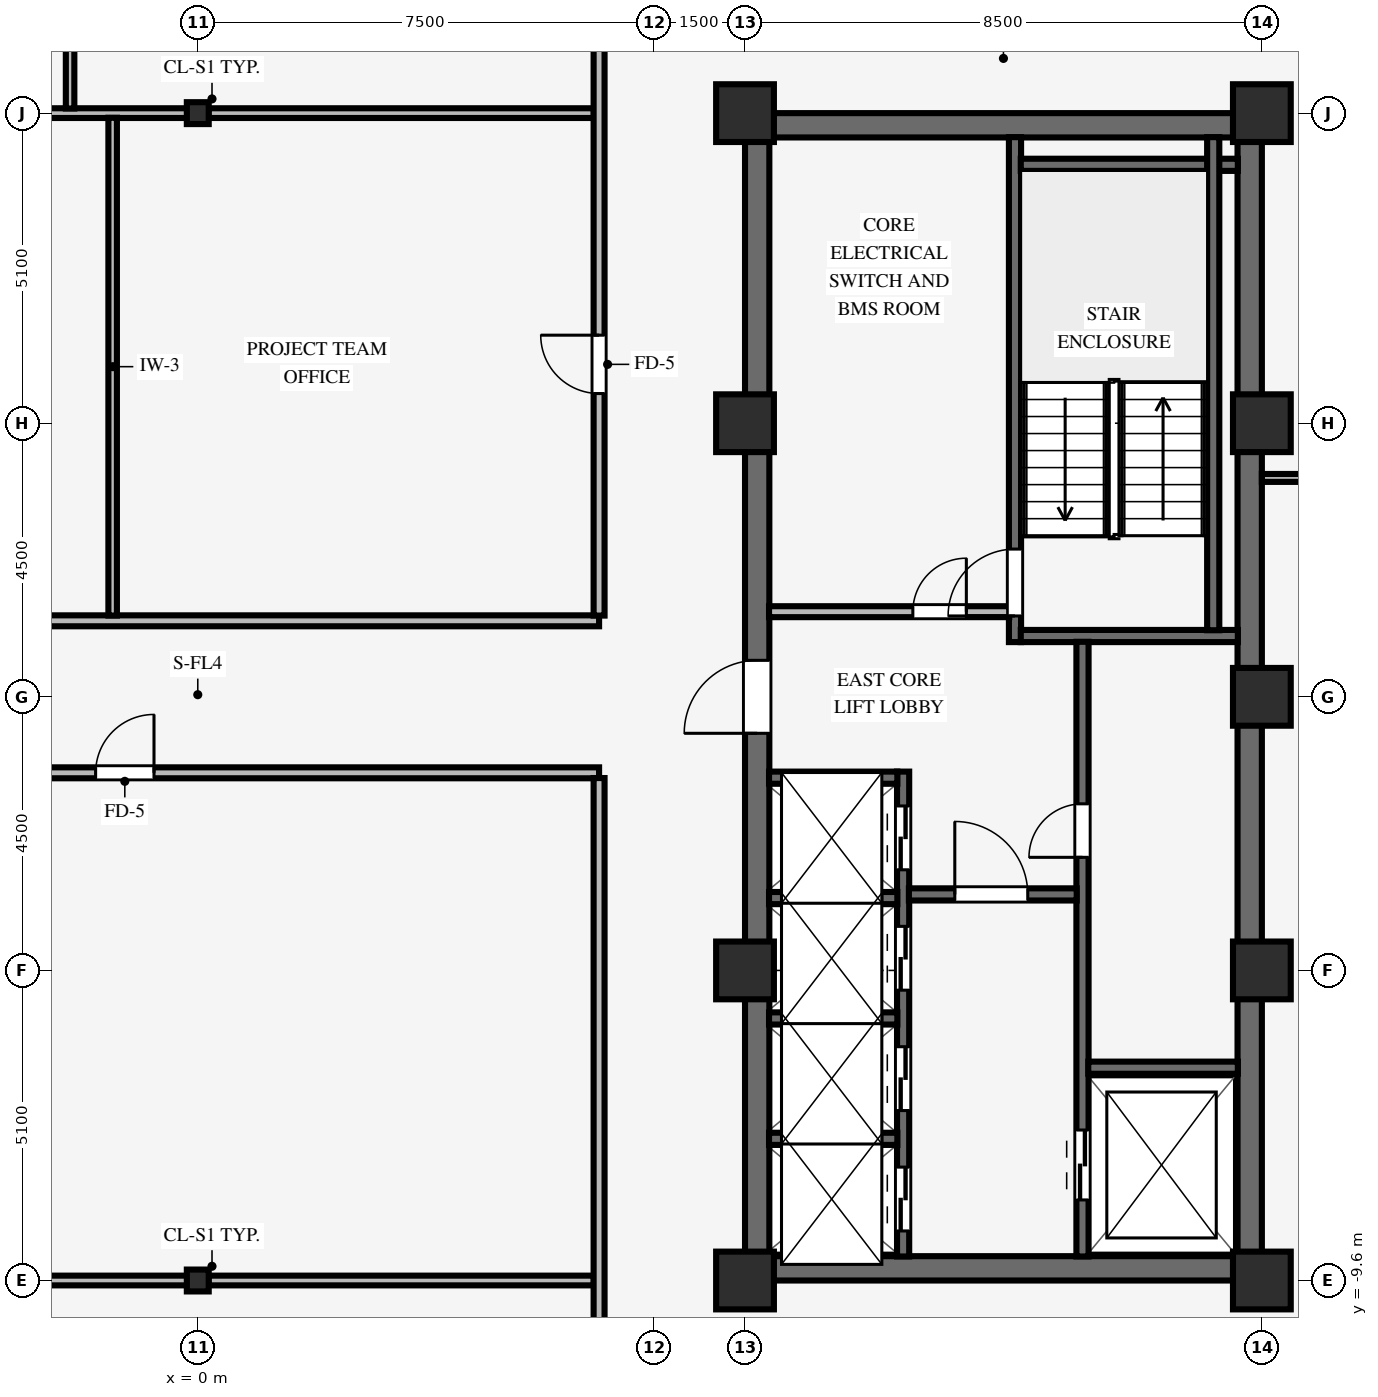
"""IFC4 building model, lengths in metres.
Left out: names, types, materials, properties, quantities, classifications, styles, units other than length and angle.
Written with IfcOpenShell. Run it as: python <this file> out.ifc"""

import sys

from ifc_helpers import new_model, si_unit, direction, frame, frame_2d, origin, origin_2d, place, context, subcontext, project, spatial, rectangle, i_section, extrude, source, transform, mapped, element, fill, save


model = new_model("IFC4")
c1 = context("Model", 3, precision=1e-05, world=origin(), true_north=direction((0.0, 1.0)))
c2 = subcontext(c1, "Body", "Model", "MODEL_VIEW")
j1 = project(units=[si_unit("LENGTHUNIT", "METRE"), si_unit("PLANEANGLEUNIT", "RADIAN")], contexts=[c1])
p1 = place(None, origin())
s1 = spatial("IfcSite", under=j1, at=p1, CompositionType="ELEMENT")
p2 = place(p1, origin())
s2 = spatial("IfcBuilding", under=s1, at=p2, CompositionType="ELEMENT")
p3 = place(p2, frame((0.0, 0.0, 164.0)))
s3 = spatial("IfcBuildingStorey", under=s2, at=p3, CompositionType="ELEMENT", Elevation=164.0)
for number, where, z_axis, x_axis in (
    (1, (9.0, -9.4, 0.0), (0.0, 0.0, 1.0), (1.0, 0.0, 0.0)),
    (2, (9.0, 9.4, 0.0), (0.0, 0.0, 1.0), (1.0, 0.0, 0.0)),
):
    element("IfcWall", number, at=place(p3, frame(where, z_axis=z_axis, x_axis=x_axis)), inside=s3, PredefinedType="SHEAR", context=c2, shape_type="SweptSolid", body=[
        extrude(rectangle(XDim=8.5, YDim=0.4, at=frame_2d((4.25, 0.0))), origin(), (0.0, 0.0, 1.0), 3.25),
    ])
p4 = place(p3, frame((9.2, -9.205, 0.0), z_axis=(0.0, 0.0, 1.0), x_axis=(0.0, 1.0, 0.0)))
e3 = element("IfcWall", 3, at=p4, inside=s3, PredefinedType="SHEAR", context=c2, shape_type="SweptSolid", body=[
    extrude(rectangle(XDim=18.41, YDim=0.4, at=frame_2d((9.205, 0.0))), origin(), (0.0, 0.0, 1.0), 3.25),
])
p5 = place(p4, frame((8.605, 0.0, 0.0)))
e4 = element("IfcOpeningElement", 4, at=p5, cuts=e3, PredefinedType="OPENING", context=c2, shape_type="SweptSolid", body=[
    extrude(rectangle(XDim=1.2, YDim=2.15, at=frame_2d((0.6, 1.075))), frame((0.0, 0.21, 0.0), z_axis=(0.0, -1.0, 0.0), x_axis=(1.0, 0.0, 0.0)), (0.0, 0.0, 1.0), 0.42),
])
p6 = place(p3, frame((17.3, -9.205, 0.0), z_axis=(0.0, 0.0, 1.0), x_axis=(0.0, 1.0, 0.0)))
e5 = element("IfcWall", 5, at=p6, inside=s3, PredefinedType="SHEAR", context=c2, shape_type="SweptSolid", body=[
    extrude(rectangle(XDim=18.41, YDim=0.4, at=frame_2d((9.205, 0.0))), origin(), (0.0, 0.0, 1.0), 3.25),
])
for number, where, z_axis, x_axis in (
    (6, (9.0, -9.6, 0.0), (0.0, 0.0, 1.0), (1.0, 0.0, 0.0)),
    (7, (9.0, -4.5, 0.0), (0.0, 0.0, 1.0), (1.0, 0.0, 0.0)),
    (8, (9.0, 4.5, 0.0), (0.0, 0.0, 1.0), (1.0, 0.0, 0.0)),
    (9, (9.0, 9.6, 0.0), (0.0, 0.0, 1.0), (1.0, 0.0, 0.0)),
    (10, (17.5, -9.6, 0.0), (0.0, 0.0, 1.0), (1.0, 0.0, 0.0)),
    (11, (17.5, -4.5, 0.0), (0.0, 0.0, 1.0), (1.0, 0.0, 0.0)),
    (12, (17.5, 4.5, 0.0), (0.0, 0.0, 1.0), (1.0, 0.0, 0.0)),
    (13, (17.5, 9.6, 0.0), (0.0, 0.0, 1.0), (1.0, 0.0, 0.0)),
    (14, (17.5, 0.0, 0.0), (0.0, 0.0, 1.0), (1.0, 0.0, 0.0)),
):
    element("IfcColumn", number, at=place(p3, frame(where, z_axis=z_axis, x_axis=x_axis)), inside=s3, PredefinedType="COLUMN", context=c2, shape_type="SweptSolid", body=[
        extrude(rectangle(XDim=0.95, YDim=0.95, at=origin_2d()), origin(), (0.0, 0.0, 1.0), 3.25),
    ])
for number, where, z_axis, x_axis in (
    (15, (0.0, -9.6, 0.0), (0.0, 0.0, 1.0), (1.0, 0.0, 0.0)),
    (16, (0.0, 9.6, 0.0), (0.0, 0.0, 1.0), (1.0, 0.0, 0.0)),
):
    element("IfcColumn", number, at=place(p3, frame(where, z_axis=z_axis, x_axis=x_axis)), inside=s3, PredefinedType="COLUMN", context=c2, shape_type="SweptSolid", body=[
        extrude(i_section(OverallWidth=0.36, OverallDepth=0.36, WebThickness=0.021, FlangeThickness=0.021, FilletRadius=0.018, at=origin_2d()), origin(), (0.0, 0.0, 1.0), 3.25),
    ])
p7 = place(p3, frame((13.44, 0.9, 0.0), z_axis=(0.0, 0.0, 1.0), x_axis=(0.0, 1.0, 0.0)))
e17 = element("IfcWall", 17, at=p7, inside=s3, PredefinedType="SHEAR", context=c2, shape_type="SweptSolid", body=[
    extrude(rectangle(XDim=8.305, YDim=0.2, at=frame_2d((4.153, 0.0))), origin(), (0.0, 0.0, 1.0), 3.25),
])
p8 = place(p7, frame((0.43, 0.0, 0.0)))
e18 = element("IfcOpeningElement", 18, at=p8, cuts=e17, PredefinedType="OPENING", context=c2, shape_type="SweptSolid", body=[
    extrude(rectangle(XDim=1.1, YDim=2.15, at=frame_2d((0.55, 1.075))), frame((0.0, 0.11, 0.0), z_axis=(0.0, -1.0, 0.0), x_axis=(1.0, 0.0, 0.0)), (0.0, 0.0, 1.0), 0.22),
])
for number, where, z_axis, x_axis in (
    (19, (13.535, 1.0, 0.0), (0.0, 0.0, 1.0), (1.0, 0.0, 0.0)),
    (20, (13.535, 8.75, 0.0), (0.0, 0.0, 1.0), (1.0, 0.0, 0.0)),
):
    element("IfcWall", number, at=place(p3, frame(where, z_axis=z_axis, x_axis=x_axis)), inside=s3, PredefinedType="SHEAR", context=c2, shape_type="SweptSolid", body=[
        extrude(rectangle(XDim=3.57, YDim=0.2, at=frame_2d((1.785, 0.0))), origin(), (0.0, 0.0, 1.0), 3.25),
    ])
p9 = place(p3, frame((16.7, 1.095, 0.0), z_axis=(0.0, 0.0, 1.0), x_axis=(0.0, 1.0, 0.0)))
e21 = element("IfcWall", 21, at=p9, inside=s3, PredefinedType="SHEAR", context=c2, shape_type="SweptSolid", body=[
    extrude(rectangle(XDim=8.11, YDim=0.2, at=frame_2d((4.055, 0.0))), origin(), (0.0, 0.0, 1.0), 3.25),
])
p10 = place(p3, frame((14.55, -9.205, 0.0), z_axis=(0.0, 0.0, 1.0), x_axis=(0.0, 1.0, 0.0)))
e22 = element("IfcWall", 22, at=p10, inside=s3, PredefinedType="SHEAR", context=c2, shape_type="SweptSolid", body=[
    extrude(rectangle(XDim=10.11, YDim=0.2, at=frame_2d((5.055, 0.0))), origin(), (0.0, 0.0, 1.0), 3.25),
])
p11 = place(p10, frame((6.565, 0.0, 0.0)))
e23 = element("IfcOpeningElement", 23, at=p11, cuts=e22, PredefinedType="OPENING", context=c2, shape_type="SweptSolid", body=[
    extrude(rectangle(XDim=0.88, YDim=2.1, at=frame_2d((0.44, 1.05))), frame((0.0, 0.11, 0.0), z_axis=(0.0, -1.0, 0.0), x_axis=(1.0, 0.0, 0.0)), (0.0, 0.0, 1.0), 0.22),
])
p12 = place(p10, frame((0.93, 0.0, 0.0)))
e24 = element("IfcOpeningElement", 24, at=p12, cuts=e22, PredefinedType="OPENING", context=c2, shape_type="SweptSolid", body=[
    extrude(rectangle(XDim=1.15, YDim=2.15, at=frame_2d((0.575, 1.075))), frame((0.0, 0.11, 0.0), z_axis=(0.0, -1.0, 0.0), x_axis=(1.0, 0.0, 0.0)), (0.0, 0.0, 1.0), 0.22),
])
p13 = place(p3, frame((14.645, -6.1, 0.0), z_axis=(0.0, 0.0, 1.0), x_axis=(1.0, 0.0, 0.0)))
e25 = element("IfcWall", 25, at=p13, inside=s3, PredefinedType="SHEAR", context=c2, shape_type="SweptSolid", body=[
    extrude(rectangle(XDim=2.46, YDim=0.2, at=frame_2d((1.23, 0.0))), origin(), (0.0, 0.0, 1.0), 3.25),
])
p14 = place(p3, frame((11.6, -9.205, 0.0), z_axis=(0.0, 0.0, 1.0), x_axis=(0.0, 1.0, 0.0)))
e26 = element("IfcWall", 26, at=p14, inside=s3, PredefinedType="SHEAR", context=c2, shape_type="SweptSolid", body=[
    extrude(rectangle(XDim=7.975, YDim=0.2, at=frame_2d((3.988, 0.0))), origin(), (0.0, 0.0, 1.0), 3.25),
])
p15 = place(p14, frame((0.42, 0.0, 0.0)))
e27 = element("IfcOpeningElement", 27, at=p15, cuts=e26, PredefinedType="OPENING", context=c2, shape_type="SweptSolid", body=[
    extrude(rectangle(XDim=1.05, YDim=2.15, at=frame_2d((0.525, 1.075))), frame((0.0, 0.11, 0.0), z_axis=(0.0, -1.0, 0.0), x_axis=(1.0, 0.0, 0.0)), (0.0, 0.0, 1.0), 0.22),
])
p16 = place(p14, frame((2.4, 0.0, 0.0)))
e28 = element("IfcOpeningElement", 28, at=p16, cuts=e26, PredefinedType="OPENING", context=c2, shape_type="SweptSolid", body=[
    extrude(rectangle(XDim=1.05, YDim=2.15, at=frame_2d((0.525, 1.075))), frame((0.0, 0.11, 0.0), z_axis=(0.0, -1.0, 0.0), x_axis=(1.0, 0.0, 0.0)), (0.0, 0.0, 1.0), 0.22),
])
p17 = place(p14, frame((4.38, 0.0, 0.0)))
e29 = element("IfcOpeningElement", 29, at=p17, cuts=e26, PredefinedType="OPENING", context=c2, shape_type="SweptSolid", body=[
    extrude(rectangle(XDim=1.05, YDim=2.15, at=frame_2d((0.525, 1.075))), frame((0.0, 0.11, 0.0), z_axis=(0.0, -1.0, 0.0), x_axis=(1.0, 0.0, 0.0)), (0.0, 0.0, 1.0), 0.22),
])
p18 = place(p14, frame((6.36, 0.0, 0.0)))
e30 = element("IfcOpeningElement", 30, at=p18, cuts=e26, PredefinedType="OPENING", context=c2, shape_type="SweptSolid", body=[
    extrude(rectangle(XDim=1.05, YDim=2.15, at=frame_2d((0.525, 1.075))), frame((0.0, 0.11, 0.0), z_axis=(0.0, -1.0, 0.0), x_axis=(1.0, 0.0, 0.0)), (0.0, 0.0, 1.0), 0.22),
])
p19 = place(p3, frame((11.695, -3.25, 0.0), z_axis=(0.0, 0.0, 1.0), x_axis=(1.0, 0.0, 0.0)))
e31 = element("IfcWall", 31, at=p19, inside=s3, PredefinedType="SHEAR", context=c2, shape_type="SweptSolid", body=[
    extrude(rectangle(XDim=2.76, YDim=0.2, at=frame_2d((1.38, 0.0))), origin(), (0.0, 0.0, 1.0), 3.25),
])
p20 = place(p19, frame((0.755, 0.0, 0.0)))
e32 = element("IfcOpeningElement", 32, at=p20, cuts=e31, PredefinedType="OPENING", context=c2, shape_type="SweptSolid", body=[
    extrude(rectangle(XDim=1.2, YDim=2.15, at=frame_2d((0.6, 1.075))), frame((0.0, 0.11, 0.0), z_axis=(0.0, -1.0, 0.0), x_axis=(1.0, 0.0, 0.0)), (0.0, 0.0, 1.0), 0.22),
])
for number, where, z_axis, x_axis in (
    (33, (9.395, -7.27, 0.0), (0.0, 0.0, 1.0), (1.0, 0.0, 0.0)),
    (34, (9.395, -5.29, 0.0), (0.0, 0.0, 1.0), (1.0, 0.0, 0.0)),
    (35, (9.395, -3.31, 0.0), (0.0, 0.0, 1.0), (1.0, 0.0, 0.0)),
    (36, (9.395, -1.33, 0.0), (0.0, 0.0, 1.0), (1.0, 0.0, 0.0)),
):
    element("IfcWall", number, at=place(p3, frame(where, z_axis=z_axis, x_axis=x_axis)), inside=s3, PredefinedType="SHEAR", context=c2, shape_type="SweptSolid", body=[
        extrude(rectangle(XDim=2.11, YDim=0.2, at=frame_2d((1.055, 0.0))), origin(), (0.0, 0.0, 1.0), 3.25),
    ])
p21 = place(p3, frame((9.395, 1.4, 0.0), z_axis=(0.0, 0.0, 1.0), x_axis=(1.0, 0.0, 0.0)))
e37 = element("IfcWall", 37, at=p21, inside=s3, PredefinedType="PARTITIONING", context=c2, shape_type="SweptSolid", body=[
    extrude(rectangle(XDim=3.95, YDim=0.18, at=frame_2d((1.975, 0.0))), origin(), (0.0, 0.0, 1.0), 3.24),
])
p22 = place(p21, frame((2.365, 0.0, 0.0)))
e38 = element("IfcOpeningElement", 38, at=p22, cuts=e37, PredefinedType="OPENING", context=c2, shape_type="SweptSolid", body=[
    extrude(rectangle(XDim=0.88, YDim=2.1, at=frame_2d((0.44, 1.05))), frame((0.0, 0.1, 0.0), z_axis=(0.0, -1.0, 0.0), x_axis=(1.0, 0.0, 0.0)), (0.0, 0.0, 1.0), 0.2),
])
p23 = place(p3, frame((-8.529, -9.6, 0.0), z_axis=(0.0, 0.0, 1.0), x_axis=(1.0, 0.0, 0.0)))
e39 = element("IfcWall", 39, at=p23, inside=s3, PredefinedType="PARTITIONING", context=c2, shape_type="SweptSolid", body=[
    extrude(rectangle(XDim=8.353, YDim=0.16, at=frame_2d((4.177, 0.0))), origin(), (0.0, 0.0, 1.0), 2.285),
])
p24 = place(p3, frame((0.176, -9.6, 0.0), z_axis=(0.0, 0.0, 1.0), x_axis=(1.0, 0.0, 0.0)))
e40 = element("IfcWall", 40, at=p24, inside=s3, PredefinedType="PARTITIONING", context=c2, shape_type="SweptSolid", body=[
    extrude(rectangle(XDim=6.338, YDim=0.16, at=frame_2d((3.169, 0.0))), origin(), (0.0, 0.0, 1.0), 2.285),
])
p25 = place(p3, frame((-9.0, -1.25, 0.0), z_axis=(0.0, 0.0, 1.0), x_axis=(1.0, 0.0, 0.0)))
e41 = element("IfcWall", 41, at=p25, inside=s3, PredefinedType="PARTITIONING", context=c2, shape_type="SweptSolid", body=[
    extrude(rectangle(XDim=15.6, YDim=0.18, at=frame_2d((7.8, 0.0))), origin(), (0.0, 0.0, 1.0), 3.24),
])
p26 = place(p25, frame((7.32, 0.0, 0.0)))
e42 = element("IfcOpeningElement", 42, at=p26, cuts=e41, PredefinedType="OPENING", context=c2, shape_type="SweptSolid", body=[
    extrude(rectangle(XDim=0.96, YDim=2.1, at=frame_2d((0.48, 1.05))), frame((0.0, 0.1, 0.0), z_axis=(0.0, -1.0, 0.0), x_axis=(1.0, 0.0, 0.0)), (0.0, 0.0, 1.0), 0.2),
])
p27 = place(p3, frame((-9.0, 1.25, 0.0), z_axis=(0.0, 0.0, 1.0), x_axis=(1.0, 0.0, 0.0)))
e43 = element("IfcWall", 43, at=p27, inside=s3, PredefinedType="PARTITIONING", context=c2, shape_type="SweptSolid", body=[
    extrude(rectangle(XDim=15.6, YDim=0.18, at=frame_2d((7.8, 0.0))), origin(), (0.0, 0.0, 1.0), 3.24),
])
p28 = place(p27, frame((3.32, 0.0, 0.0)))
e44 = element("IfcOpeningElement", 44, at=p28, cuts=e43, PredefinedType="OPENING", context=c2, shape_type="SweptSolid", body=[
    extrude(rectangle(XDim=0.96, YDim=2.1, at=frame_2d((0.48, 1.05))), frame((0.0, 0.1, 0.0), z_axis=(0.0, -1.0, 0.0), x_axis=(1.0, 0.0, 0.0)), (0.0, 0.0, 1.0), 0.2),
])
p29 = place(p3, frame((17.5, 3.6, 0.0), z_axis=(0.0, 0.0, 1.0), x_axis=(1.0, 0.0, 0.0)))
e45 = element("IfcWall", 45, at=p29, inside=s3, PredefinedType="PARTITIONING", context=c2, shape_type="SweptSolid", body=[
    extrude(rectangle(XDim=8.58, YDim=0.13, at=frame_2d((4.29, 0.0))), origin(), (0.0, 0.0, 1.0), 3.24),
])
p30 = place(p3, frame((-8.529, 9.6, 0.0), z_axis=(0.0, 0.0, 1.0), x_axis=(1.0, 0.0, 0.0)))
e46 = element("IfcWall", 46, at=p30, inside=s3, PredefinedType="PARTITIONING", context=c2, shape_type="SweptSolid", body=[
    extrude(rectangle(XDim=8.353, YDim=0.16, at=frame_2d((4.177, 0.0))), origin(), (0.0, 0.0, 1.0), 2.285),
])
p31 = place(p3, frame((0.176, 9.6, 0.0), z_axis=(0.0, 0.0, 1.0), x_axis=(1.0, 0.0, 0.0)))
e47 = element("IfcWall", 47, at=p31, inside=s3, PredefinedType="PARTITIONING", context=c2, shape_type="SweptSolid", body=[
    extrude(rectangle(XDim=6.338, YDim=0.16, at=frame_2d((3.169, 0.0))), origin(), (0.0, 0.0, 1.0), 2.285),
])
p32 = place(p3, frame((-2.1, 9.676, 0.0), z_axis=(0.0, 0.0, 1.0), x_axis=(0.0, 1.0, 0.0)))
e48 = element("IfcWall", 48, at=p32, inside=s3, PredefinedType="PARTITIONING", context=c2, shape_type="SweptSolid", body=[
    extrude(rectangle(XDim=3.738, YDim=0.14, at=frame_2d((1.869, 0.0))), origin(), (0.0, 0.0, 1.0), 3.24),
])
p33 = place(p3, frame((-1.4, 1.336, 0.0), z_axis=(0.0, 0.0, 1.0), x_axis=(0.0, 1.0, 0.0)))
e49 = element("IfcWall", 49, at=p33, inside=s3, PredefinedType="PARTITIONING", context=c2, shape_type="SweptSolid", body=[
    extrude(rectangle(XDim=8.188, YDim=0.14, at=frame_2d((4.094, 0.0))), origin(), (0.0, 0.0, 1.0), 3.24),
])
p34 = place(p3, frame((6.6, -13.414, 0.0), z_axis=(0.0, 0.0, 1.0), x_axis=(0.0, 1.0, 0.0)))
e50 = element("IfcWall", 50, at=p34, inside=s3, PredefinedType="PARTITIONING", context=c2, shape_type="SweptSolid", body=[
    extrude(rectangle(XDim=12.078, YDim=0.18, at=frame_2d((6.039, 0.0))), origin(), (0.0, 0.0, 1.0), 3.24),
])
p35 = place(p3, frame((6.6, 1.336, 0.0), z_axis=(0.0, 0.0, 1.0), x_axis=(0.0, 1.0, 0.0)))
e51 = element("IfcWall", 51, at=p35, inside=s3, PredefinedType="PARTITIONING", context=c2, shape_type="SweptSolid", body=[
    extrude(rectangle(XDim=12.078, YDim=0.18, at=frame_2d((6.039, 0.0))), origin(), (0.0, 0.0, 1.0), 3.24),
])
p36 = place(p35, frame((3.652, 0.0, 0.0)))
e52 = element("IfcOpeningElement", 52, at=p36, cuts=e51, PredefinedType="OPENING", context=c2, shape_type="SweptSolid", body=[
    extrude(rectangle(XDim=0.96, YDim=2.1, at=frame_2d((0.48, 1.05))), frame((0.0, 0.1, 0.0), z_axis=(0.0, -1.0, 0.0), x_axis=(1.0, 0.0, 0.0)), (0.0, 0.0, 1.0), 0.2),
])
m1 = source(origin(), c2, "Body", "SweptSolid", [
    extrude(rectangle(XDim=1.1, YDim=2.15, at=frame_2d((0.55, 1.075))), frame((0.0, 0.025, 0.0), z_axis=(0.0, -1.0, 0.0), x_axis=(1.0, 0.0, 0.0)), (0.0, 0.0, 1.0), 0.05),
])
p37 = place(p8, origin())
e53 = element("IfcDoor", 53, at=p37, inside=s3, OperationType="SINGLE_SWING_LEFT", PredefinedType="DOOR", context=c2, shape_type="MappedRepresentation", body=[
    mapped(m1, transform((0.0, 0.0, 0.0), scale=1.0)),
])
fill(e18, e53)
m2 = source(origin(), c2, "Body", "SweptSolid", [
    extrude(rectangle(XDim=0.88, YDim=2.1, at=frame_2d((0.44, 1.05))), frame((0.0, 0.025, 0.0), z_axis=(0.0, -1.0, 0.0), x_axis=(1.0, 0.0, 0.0)), (0.0, 0.0, 1.0), 0.05),
])
p38 = place(p11, origin())
e54 = element("IfcDoor", 54, at=p38, inside=s3, OperationType="SINGLE_SWING_LEFT", PredefinedType="DOOR", context=c2, shape_type="MappedRepresentation", body=[
    mapped(m2, transform((0.0, 0.0, 0.0), scale=1.0)),
])
fill(e23, e54)
m3 = source(origin(), c2, "Body", "SweptSolid", [
    extrude(rectangle(XDim=1.2, YDim=2.15, at=frame_2d((0.6, 1.075))), frame((0.0, 0.025, 0.0), z_axis=(0.0, -1.0, 0.0), x_axis=(1.0, 0.0, 0.0)), (0.0, 0.0, 1.0), 0.05),
])
p39 = place(p20, origin())
e55 = element("IfcDoor", 55, at=p39, inside=s3, OperationType="SINGLE_SWING_LEFT", PredefinedType="DOOR", context=c2, shape_type="MappedRepresentation", body=[
    mapped(m3, transform((0.0, 0.0, 0.0), scale=1.0)),
])
fill(e32, e55)
p40 = place(p5, origin())
e56 = element("IfcDoor", 56, at=p40, inside=s3, OperationType="SINGLE_SWING_LEFT", PredefinedType="DOOR", context=c2, shape_type="MappedRepresentation", body=[
    mapped(m3, transform((0.0, 0.0, 0.0), scale=1.0)),
])
fill(e4, e56)
p41 = place(p22, origin())
e57 = element("IfcDoor", 57, at=p41, inside=s3, OperationType="SINGLE_SWING_RIGHT", PredefinedType="DOOR", context=c2, shape_type="MappedRepresentation", body=[
    mapped(m2, transform((0.0, 0.0, 0.0), scale=1.0)),
])
fill(e38, e57)
m4 = source(origin(), c2, "Body", "SweptSolid", [
    extrude(rectangle(XDim=1.15, YDim=2.15, at=frame_2d((0.575, 1.075))), frame((0.0, 0.025, 0.0), z_axis=(0.0, -1.0, 0.0), x_axis=(1.0, 0.0, 0.0)), (0.0, 0.0, 1.0), 0.05),
])
p42 = place(p12, origin())
e58 = element("IfcDoor", 58, at=p42, inside=s3, OperationType="DOUBLE_DOOR_SLIDING", PredefinedType="DOOR", context=c2, shape_type="MappedRepresentation", body=[
    mapped(m4, transform((0.0, 0.0, 0.0), scale=1.0)),
])
fill(e24, e58)
m5 = source(origin(), c2, "Body", "SweptSolid", [
    extrude(rectangle(XDim=1.05, YDim=2.15, at=frame_2d((0.525, 1.075))), frame((0.0, 0.025, 0.0), z_axis=(0.0, -1.0, 0.0), x_axis=(1.0, 0.0, 0.0)), (0.0, 0.0, 1.0), 0.05),
])
p43 = place(p15, origin())
e59 = element("IfcDoor", 59, at=p43, inside=s3, OperationType="DOUBLE_DOOR_SLIDING", PredefinedType="DOOR", context=c2, shape_type="MappedRepresentation", body=[
    mapped(m5, transform((0.0, 0.0, 0.0), scale=1.0)),
])
fill(e27, e59)
p44 = place(p16, origin())
e60 = element("IfcDoor", 60, at=p44, inside=s3, OperationType="DOUBLE_DOOR_SLIDING", PredefinedType="DOOR", context=c2, shape_type="MappedRepresentation", body=[
    mapped(m5, transform((0.0, 0.0, 0.0), scale=1.0)),
])
fill(e28, e60)
p45 = place(p17, origin())
e61 = element("IfcDoor", 61, at=p45, inside=s3, OperationType="DOUBLE_DOOR_SLIDING", PredefinedType="DOOR", context=c2, shape_type="MappedRepresentation", body=[
    mapped(m5, transform((0.0, 0.0, 0.0), scale=1.0)),
])
fill(e29, e61)
p46 = place(p18, origin())
e62 = element("IfcDoor", 62, at=p46, inside=s3, OperationType="DOUBLE_DOOR_SLIDING", PredefinedType="DOOR", context=c2, shape_type="MappedRepresentation", body=[
    mapped(m5, transform((0.0, 0.0, 0.0), scale=1.0)),
])
fill(e30, e62)
m6 = source(origin(), c2, "Body", "SweptSolid", [
    extrude(rectangle(XDim=0.96, YDim=2.1, at=frame_2d((0.48, 1.05))), frame((0.0, 0.025, 0.0), z_axis=(0.0, -1.0, 0.0), x_axis=(1.0, 0.0, 0.0)), (0.0, 0.0, 1.0), 0.05),
])
p47 = place(p26, origin())
e63 = element("IfcDoor", 63, at=p47, inside=s3, OperationType="SINGLE_SWING_RIGHT", PredefinedType="DOOR", context=c2, shape_type="MappedRepresentation", body=[
    mapped(m6, transform((0.0, 0.0, 0.0), scale=1.0)),
])
fill(e42, e63)
p48 = place(p36, origin())
e64 = element("IfcDoor", 64, at=p48, inside=s3, OperationType="SINGLE_SWING_RIGHT", PredefinedType="DOOR", context=c2, shape_type="MappedRepresentation", body=[
    mapped(m6, transform((0.0, 0.0, 0.0), scale=1.0)),
])
fill(e52, e64)
save(model, sys.argv[1])
